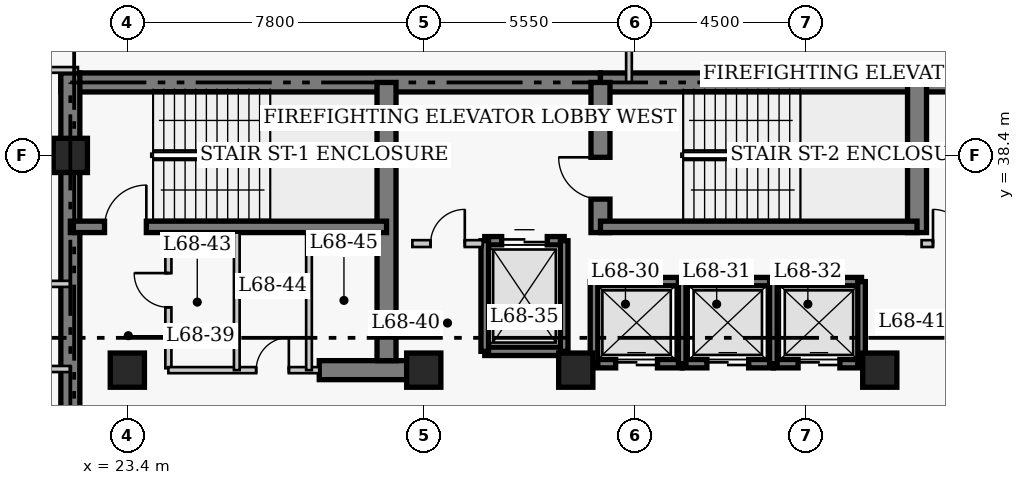
"""IFC4 building model, lengths in metres.
Left out: names, types, materials, properties, quantities, classifications, styles, units other than length and angle.
Written with IfcOpenShell. Run it as: python <this file> out.ifc"""

import sys

from ifc_helpers import new_model, si_unit, direction, frame, frame_2d, origin, origin_2d, place, context, subcontext, project, spatial, rectangle, extrude, element, fill, save


model = new_model("IFC4")
c1 = context("Model", 3, precision=1e-05, world=origin(), true_north=direction((0.0, 1.0)))
c2 = subcontext(c1, "Body", "Model", "MODEL_VIEW")
j1 = project(units=[si_unit("LENGTHUNIT", "METRE"), si_unit("PLANEANGLEUNIT", "RADIAN")], contexts=[c1])
p1 = place(None, origin())
s1 = spatial("IfcSite", under=j1, at=p1, CompositionType="ELEMENT")
p2 = place(p1, origin())
s2 = spatial("IfcBuilding", under=s1, at=p2, CompositionType="ELEMENT")
p3 = place(p2, frame((0.0, 0.0, 273.4)))
s3 = spatial("IfcBuildingStorey", under=s2, at=p3, CompositionType="ELEMENT", Elevation=273.4)
p4 = place(p3, frame((21.65, 40.32, 0.0), z_axis=(0.0, 0.0, 1.0), x_axis=(1.0, 0.0, 0.0)))
e1 = element("IfcWall", 1, at=p4, inside=s3, PredefinedType="SHEAR", context=c2, shape_type="SweptSolid", body=[
    extrude(rectangle(XDim=14.2, YDim=0.5, at=frame_2d((7.1, 0.0))), origin(), (0.0, 0.0, 1.0), 4.0),
])
p5 = place(p3, frame((35.85, 40.32, 0.0), z_axis=(0.0, 0.0, 1.0), x_axis=(1.0, 0.0, 0.0)))
e2 = element("IfcWall", 2, at=p5, inside=s3, PredefinedType="SHEAR", context=c2, shape_type="SweptSolid", body=[
    extrude(rectangle(XDim=12.6, YDim=0.5, at=frame_2d((6.3, 0.0))), origin(), (0.0, 0.0, 1.0), 4.0),
])
p6 = place(p3, frame((21.9, 27.05, 0.0), z_axis=(0.0, 0.0, 1.0), x_axis=(0.0, 1.0, 0.0)))
e3 = element("IfcWall", 3, at=p6, inside=s3, PredefinedType="SHEAR", context=c2, shape_type="SweptSolid", body=[
    extrude(rectangle(XDim=13.52, YDim=0.5, at=frame_2d((6.76, 0.0))), origin(), (0.0, 0.0, 1.0), 4.0),
])
p7 = place(p3, frame((28.45, 32.75, 0.0), z_axis=(0.0, 0.0, 1.0), x_axis=(1.0, 0.0, 0.0)))
e4 = element("IfcWall", 4, at=p7, inside=s3, PredefinedType="SHEAR", context=c2, shape_type="SweptSolid", body=[
    extrude(rectangle(XDim=2.4, YDim=0.5, at=frame_2d((1.2, 0.0))), origin(), (0.0, 0.0, 1.0), 4.0),
])
p8 = place(p3, frame((30.22, 33.0, 0.0), z_axis=(0.0, 0.0, 1.0), x_axis=(0.0, 1.0, 0.0)))
e5 = element("IfcWall", 5, at=p8, inside=s3, PredefinedType="SHEAR", context=c2, shape_type="SweptSolid", body=[
    extrude(rectangle(XDim=7.32, YDim=0.5, at=frame_2d((3.66, 0.0))), origin(), (0.0, 0.0, 1.0), 4.0),
])
p9 = place(p3, frame((35.85, 36.37, 0.0), z_axis=(0.0, 0.0, 1.0), x_axis=(0.0, 1.0, 0.0)))
e6 = element("IfcWall", 6, at=p9, inside=s3, PredefinedType="SHEAR", context=c2, shape_type="SweptSolid", body=[
    extrude(rectangle(XDim=3.95, YDim=0.5, at=frame_2d((1.975, 0.0))), origin(), (0.0, 0.0, 1.0), 4.0),
])
p10 = place(p9, frame((0.88, 0.0, 0.0)))
e7 = element("IfcOpeningElement", 7, at=p10, cuts=e6, PredefinedType="OPENING", context=c2, shape_type="SweptSolid", body=[
    extrude(rectangle(XDim=1.1, YDim=2.15, at=frame_2d((0.55, 1.075))), frame((0.0, 0.26, 0.0), z_axis=(0.0, -1.0, 0.0), x_axis=(1.0, 0.0, 0.0)), (0.0, 0.0, 1.0), 0.52),
])
p11 = place(p3, frame((44.18, 36.37, 0.0), z_axis=(0.0, 0.0, 1.0), x_axis=(0.0, 1.0, 0.0)))
e8 = element("IfcWall", 8, at=p11, inside=s3, PredefinedType="SHEAR", context=c2, shape_type="SweptSolid", body=[
    extrude(rectangle(XDim=3.95, YDim=0.5, at=frame_2d((1.975, 0.0))), origin(), (0.0, 0.0, 1.0), 4.0),
])
p12 = place(p3, frame((21.9, 36.52, 0.0), z_axis=(0.0, 0.0, 1.0), x_axis=(1.0, 0.0, 0.0)))
e9 = element("IfcWall", 9, at=p12, inside=s3, PredefinedType="SHEAR", context=c2, shape_type="SweptSolid", body=[
    extrude(rectangle(XDim=8.32, YDim=0.3, at=frame_2d((4.16, 0.0))), origin(), (0.0, 0.0, 1.0), 4.0),
])
p13 = place(p12, frame((0.9, 0.0, 0.0)))
e10 = element("IfcOpeningElement", 10, at=p13, cuts=e9, PredefinedType="OPENING", context=c2, shape_type="SweptSolid", body=[
    extrude(rectangle(XDim=1.1, YDim=2.15, at=frame_2d((0.55, 1.075))), frame((0.0, 0.16, 0.0), z_axis=(0.0, -1.0, 0.0), x_axis=(1.0, 0.0, 0.0)), (0.0, 0.0, 1.0), 0.32),
])
p14 = place(p3, frame((35.85, 36.52, 0.0), z_axis=(0.0, 0.0, 1.0), x_axis=(1.0, 0.0, 0.0)))
e11 = element("IfcWall", 11, at=p14, inside=s3, PredefinedType="SHEAR", context=c2, shape_type="SweptSolid", body=[
    extrude(rectangle(XDim=8.33, YDim=0.3, at=frame_2d((4.165, 0.0))), origin(), (0.0, 0.0, 1.0), 4.0),
])
for number, where, z_axis, x_axis in (
    (12, (21.9, 38.4, 0.0), (0.0, 0.0, 1.0), (1.0, 0.0, 0.0)),
    (13, (23.4, 32.75, 0.0), (0.0, 0.0, 1.0), (1.0, 0.0, 0.0)),
    (14, (31.2, 32.75, 0.0), (0.0, 0.0, 1.0), (1.0, 0.0, 0.0)),
    (15, (35.2, 32.75, 0.0), (0.0, 0.0, 1.0), (1.0, 0.0, 0.0)),
    (16, (43.2, 32.75, 0.0), (0.0, 0.0, 1.0), (1.0, 0.0, 0.0)),
):
    element("IfcColumn", number, at=place(p3, frame(where, z_axis=z_axis, x_axis=x_axis)), inside=s3, PredefinedType="COLUMN", context=c2, shape_type="SweptSolid", body=[
        extrude(rectangle(XDim=0.9, YDim=0.9, at=origin_2d()), origin(), (0.0, 0.0, 1.0), 4.0),
    ])
p15 = place(p3, frame((35.68, 35.08, 0.0), z_axis=(0.0, 0.0, 1.0), x_axis=(1.0, 0.0, 0.0)))
e17 = element("IfcWall", 17, at=p15, inside=s3, PredefinedType="SHEAR", context=c2, shape_type="SweptSolid", body=[
    extrude(rectangle(XDim=2.32, YDim=0.22, at=frame_2d((1.16, 0.0))), origin(), (0.0, 0.0, 1.0), 4.0),
])
p16 = place(p3, frame((35.68, 32.92, 0.0), z_axis=(0.0, 0.0, 1.0), x_axis=(1.0, 0.0, 0.0)))
e18 = element("IfcWall", 18, at=p16, inside=s3, PredefinedType="SHEAR", context=c2, shape_type="SweptSolid", body=[
    extrude(rectangle(XDim=2.32, YDim=0.22, at=frame_2d((1.16, 0.0))), origin(), (0.0, 0.0, 1.0), 4.0),
])
p17 = place(p16, frame((0.57, 0.0, 0.0)))
e19 = element("IfcOpeningElement", 19, at=p17, cuts=e18, PredefinedType="OPENING", context=c2, shape_type="SweptSolid", body=[
    extrude(rectangle(XDim=1.1, YDim=2.15, at=frame_2d((0.55, 1.075))), frame((0.0, 0.12, 0.0), z_axis=(0.0, -1.0, 0.0), x_axis=(1.0, 0.0, 0.0)), (0.0, 0.0, 1.0), 0.24),
])
p18 = place(p3, frame((35.68, 32.92, 0.0), z_axis=(0.0, 0.0, 1.0), x_axis=(0.0, 1.0, 0.0)))
e20 = element("IfcWall", 20, at=p18, inside=s3, PredefinedType="SHEAR", context=c2, shape_type="SweptSolid", body=[
    extrude(rectangle(XDim=2.16, YDim=0.2, at=frame_2d((1.08, 0.0))), origin(), (0.0, 0.0, 1.0), 4.0),
])
p19 = place(p3, frame((38.0, 35.08, 0.0), z_axis=(0.0, 0.0, 1.0), x_axis=(1.0, 0.0, 0.0)))
e21 = element("IfcWall", 21, at=p19, inside=s3, PredefinedType="SHEAR", context=c2, shape_type="SweptSolid", body=[
    extrude(rectangle(XDim=2.4, YDim=0.22, at=frame_2d((1.2, 0.0))), origin(), (0.0, 0.0, 1.0), 4.0),
])
p20 = place(p3, frame((38.0, 32.92, 0.0), z_axis=(0.0, 0.0, 1.0), x_axis=(1.0, 0.0, 0.0)))
e22 = element("IfcWall", 22, at=p20, inside=s3, PredefinedType="SHEAR", context=c2, shape_type="SweptSolid", body=[
    extrude(rectangle(XDim=2.4, YDim=0.22, at=frame_2d((1.2, 0.0))), origin(), (0.0, 0.0, 1.0), 4.0),
])
p21 = place(p20, frame((0.65, 0.0, 0.0)))
e23 = element("IfcOpeningElement", 23, at=p21, cuts=e22, PredefinedType="OPENING", context=c2, shape_type="SweptSolid", body=[
    extrude(rectangle(XDim=1.1, YDim=2.15, at=frame_2d((0.55, 1.075))), frame((0.0, 0.12, 0.0), z_axis=(0.0, -1.0, 0.0), x_axis=(1.0, 0.0, 0.0)), (0.0, 0.0, 1.0), 0.24),
])
p22 = place(p3, frame((38.0, 32.92, 0.0), z_axis=(0.0, 0.0, 1.0), x_axis=(0.0, 1.0, 0.0)))
e24 = element("IfcWall", 24, at=p22, inside=s3, PredefinedType="SHEAR", context=c2, shape_type="SweptSolid", body=[
    extrude(rectangle(XDim=2.16, YDim=0.2, at=frame_2d((1.08, 0.0))), origin(), (0.0, 0.0, 1.0), 4.0),
])
p23 = place(p3, frame((40.4, 35.08, 0.0), z_axis=(0.0, 0.0, 1.0), x_axis=(1.0, 0.0, 0.0)))
e25 = element("IfcWall", 25, at=p23, inside=s3, PredefinedType="SHEAR", context=c2, shape_type="SweptSolid", body=[
    extrude(rectangle(XDim=2.32, YDim=0.22, at=frame_2d((1.16, 0.0))), origin(), (0.0, 0.0, 1.0), 4.0),
])
p24 = place(p3, frame((40.4, 32.92, 0.0), z_axis=(0.0, 0.0, 1.0), x_axis=(1.0, 0.0, 0.0)))
e26 = element("IfcWall", 26, at=p24, inside=s3, PredefinedType="SHEAR", context=c2, shape_type="SweptSolid", body=[
    extrude(rectangle(XDim=2.32, YDim=0.22, at=frame_2d((1.16, 0.0))), origin(), (0.0, 0.0, 1.0), 4.0),
])
p25 = place(p24, frame((0.65, 0.0, 0.0)))
e27 = element("IfcOpeningElement", 27, at=p25, cuts=e26, PredefinedType="OPENING", context=c2, shape_type="SweptSolid", body=[
    extrude(rectangle(XDim=1.1, YDim=2.15, at=frame_2d((0.55, 1.075))), frame((0.0, 0.12, 0.0), z_axis=(0.0, -1.0, 0.0), x_axis=(1.0, 0.0, 0.0)), (0.0, 0.0, 1.0), 0.24),
])
for number, where, z_axis, x_axis in (
    (28, (40.4, 32.92, 0.0), (0.0, 0.0, 1.0), (0.0, 1.0, 0.0)),
    (29, (42.72, 32.92, 0.0), (0.0, 0.0, 1.0), (0.0, 1.0, 0.0)),
):
    element("IfcWall", number, at=place(p3, frame(where, z_axis=z_axis, x_axis=x_axis)), inside=s3, PredefinedType="SHEAR", context=c2, shape_type="SweptSolid", body=[
        extrude(rectangle(XDim=2.16, YDim=0.2, at=frame_2d((1.08, 0.0))), origin(), (0.0, 0.0, 1.0), 4.0),
    ])
p26 = place(p3, frame((32.805, 36.155, 0.0), z_axis=(0.0, 0.0, 1.0), x_axis=(1.0, 0.0, 0.0)))
e30 = element("IfcWall", 30, at=p26, inside=s3, PredefinedType="SHEAR", context=c2, shape_type="SweptSolid", body=[
    extrude(rectangle(XDim=2.09, YDim=0.22, at=frame_2d((1.045, 0.0))), origin(), (0.0, 0.0, 1.0), 4.0),
])
p27 = place(p26, frame((0.445, 0.0, 0.0)))
e31 = element("IfcOpeningElement", 31, at=p27, cuts=e30, PredefinedType="OPENING", context=c2, shape_type="SweptSolid", body=[
    extrude(rectangle(XDim=1.2, YDim=2.15, at=frame_2d((0.6, 1.075))), frame((0.0, 0.12, 0.0), z_axis=(0.0, -1.0, 0.0), x_axis=(1.0, 0.0, 0.0)), (0.0, 0.0, 1.0), 0.24),
])
p28 = place(p3, frame((32.805, 33.245, 0.0), z_axis=(0.0, 0.0, 1.0), x_axis=(1.0, 0.0, 0.0)))
e32 = element("IfcWall", 32, at=p28, inside=s3, PredefinedType="SHEAR", context=c2, shape_type="SweptSolid", body=[
    extrude(rectangle(XDim=2.09, YDim=0.22, at=frame_2d((1.045, 0.0))), origin(), (0.0, 0.0, 1.0), 4.0),
])
for number, where, z_axis, x_axis in (
    (33, (32.805, 33.245, 0.0), (0.0, 0.0, 1.0), (0.0, 1.0, 0.0)),
    (34, (34.895, 33.245, 0.0), (0.0, 0.0, 1.0), (0.0, 1.0, 0.0)),
):
    element("IfcWall", number, at=place(p3, frame(where, z_axis=z_axis, x_axis=x_axis)), inside=s3, PredefinedType="SHEAR", context=c2, shape_type="SweptSolid", body=[
        extrude(rectangle(XDim=2.91, YDim=0.2, at=frame_2d((1.455, 0.0))), origin(), (0.0, 0.0, 1.0), 4.0),
    ])
p29 = place(p3, frame((30.9, 36.08, 0.0), z_axis=(0.0, 0.0, 1.0), x_axis=(1.0, 0.0, 0.0)))
e35 = element("IfcWall", 35, at=p29, inside=s3, PredefinedType="PARTITIONING", context=c2, shape_type="SweptSolid", body=[
    extrude(rectangle(XDim=1.85, YDim=0.18, at=frame_2d((0.925, 0.0))), origin(), (0.0, 0.0, 1.0), 3.76),
])
p30 = place(p29, frame((0.48, 0.0, 0.0)))
e36 = element("IfcOpeningElement", 36, at=p30, cuts=e35, PredefinedType="OPENING", context=c2, shape_type="SweptSolid", body=[
    extrude(rectangle(XDim=0.9, YDim=2.15, at=frame_2d((0.45, 1.075))), frame((0.0, 0.1, 0.0), z_axis=(0.0, -1.0, 0.0), x_axis=(1.0, 0.0, 0.0)), (0.0, 0.0, 1.0), 0.2),
])
p31 = place(p3, frame((44.3, 36.08, 0.0), z_axis=(0.0, 0.0, 1.0), x_axis=(1.0, 0.0, 0.0)))
e37 = element("IfcWall", 37, at=p31, inside=s3, PredefinedType="PARTITIONING", context=c2, shape_type="SweptSolid", body=[
    extrude(rectangle(XDim=1.5, YDim=0.18, at=frame_2d((0.75, 0.0))), origin(), (0.0, 0.0, 1.0), 3.76),
])
p32 = place(p31, frame((0.3, 0.0, 0.0)))
e38 = element("IfcOpeningElement", 38, at=p32, cuts=e37, PredefinedType="OPENING", context=c2, shape_type="SweptSolid", body=[
    extrude(rectangle(XDim=0.9, YDim=2.15, at=frame_2d((0.45, 1.075))), frame((0.0, 0.1, 0.0), z_axis=(0.0, -1.0, 0.0), x_axis=(1.0, 0.0, 0.0)), (0.0, 0.0, 1.0), 0.2),
])
p33 = place(p3, frame((24.48, 32.8, 0.0), z_axis=(0.0, 0.0, 1.0), x_axis=(0.0, 1.0, 0.0)))
e39 = element("IfcWall", 39, at=p33, inside=s3, PredefinedType="PARTITIONING", context=c2, shape_type="SweptSolid", body=[
    extrude(rectangle(XDim=3.57, YDim=0.16, at=frame_2d((1.785, 0.0))), origin(), (0.0, 0.0, 1.0), 3.76),
])
p34 = place(p33, frame((1.604, 0.0, 0.0)))
e40 = element("IfcOpeningElement", 40, at=p34, cuts=e39, PredefinedType="OPENING", context=c2, shape_type="SweptSolid", body=[
    extrude(rectangle(XDim=0.9, YDim=2.1, at=frame_2d((0.45, 1.05))), frame((0.0, 0.09, 0.0), z_axis=(0.0, -1.0, 0.0), x_axis=(1.0, 0.0, 0.0)), (0.0, 0.0, 1.0), 0.18),
])
p35 = place(p3, frame((24.48, 32.75, 0.0), z_axis=(0.0, 0.0, 1.0), x_axis=(1.0, 0.0, 0.0)))
e41 = element("IfcWall", 41, at=p35, inside=s3, PredefinedType="PARTITIONING", context=c2, shape_type="SweptSolid", body=[
    extrude(rectangle(XDim=3.97, YDim=0.16, at=frame_2d((1.985, 0.0))), origin(), (0.0, 0.0, 1.0), 3.76),
])
p36 = place(p35, frame((2.31, 0.0, 0.0)))
e42 = element("IfcOpeningElement", 42, at=p36, cuts=e41, PredefinedType="OPENING", context=c2, shape_type="SweptSolid", body=[
    extrude(rectangle(XDim=0.86, YDim=2.05, at=frame_2d((0.43, 1.025))), frame((0.0, 0.09, 0.0), z_axis=(0.0, -1.0, 0.0), x_axis=(1.0, 0.0, 0.0)), (0.0, 0.0, 1.0), 0.18),
])
for number, where, z_axis, x_axis in (
    (43, (26.28, 32.75, 0.0), (0.0, 0.0, 1.0), (0.0, 1.0, 0.0)),
    (44, (28.18, 32.75, 0.0), (0.0, 0.0, 1.0), (0.0, 1.0, 0.0)),
):
    element("IfcWall", number, at=place(p3, frame(where, z_axis=z_axis, x_axis=x_axis)), inside=s3, PredefinedType="PARTITIONING", context=c2, shape_type="SweptSolid", body=[
        extrude(rectangle(XDim=3.62, YDim=0.15, at=frame_2d((1.81, 0.0))), origin(), (0.0, 0.0, 1.0), 3.76),
    ])
for number, where, z_axis, x_axis in (
    (45, (20.46, 35.02, 0.0), (0.0, 0.0, 1.0), (1.0, 0.0, 0.0)),
    (46, (20.46, 32.78, 0.0), (0.0, 0.0, 1.0), (1.0, 0.0, 0.0)),
):
    element("IfcWall", number, at=place(p3, frame(where, z_axis=z_axis, x_axis=x_axis)), inside=s3, PredefinedType="PARTITIONING", context=c2, shape_type="SweptSolid", body=[
        extrude(rectangle(XDim=1.44, YDim=0.16, at=frame_2d((0.72, 0.0))), origin(), (0.0, 0.0, 1.0), 3.76),
    ])
p37 = place(p3, frame((18.24, 40.65, 0.0), z_axis=(0.0, 0.0, 1.0), x_axis=(1.0, 0.0, 0.0)))
e47 = element("IfcWall", 47, at=p37, inside=s3, PredefinedType="PARTITIONING", context=c2, shape_type="SweptSolid", body=[
    extrude(rectangle(XDim=3.86, YDim=0.15, at=frame_2d((1.93, 0.0))), origin(), (0.0, 0.0, 1.0), 3.76),
])
p38 = place(p37, frame((0.55, 0.0, 0.0)))
e48 = element("IfcOpeningElement", 48, at=p38, cuts=e47, PredefinedType="OPENING", context=c2, shape_type="SweptSolid", body=[
    extrude(rectangle(XDim=1.0, YDim=2.15, at=frame_2d((0.5, 1.075))), frame((0.0, 0.085, 0.0), z_axis=(0.0, -1.0, 0.0), x_axis=(1.0, 0.0, 0.0)), (0.0, 0.0, 1.0), 0.17),
])
p39 = place(p3, frame((36.6, 40.32, 0.0), z_axis=(0.0, 0.0, 1.0), x_axis=(0.0, 1.0, 0.0)))
e49 = element("IfcWall", 49, at=p39, inside=s3, PredefinedType="PARTITIONING", context=c2, shape_type="SweptSolid", body=[
    extrude(rectangle(XDim=3.545, YDim=0.15, at=frame_2d((1.772, 0.0))), origin(), (0.0, 0.0, 1.0), 3.76),
])
p40 = place(p17, origin())
e50 = element("IfcDoor", 50, at=p40, inside=s3, OperationType="DOUBLE_DOOR_SLIDING", PredefinedType="DOOR", context=c2, shape_type="SweptSolid", body=[
    extrude(rectangle(XDim=1.1, YDim=2.15, at=frame_2d((0.55, 1.075))), frame((0.0, 0.025, 0.0), z_axis=(0.0, -1.0, 0.0), x_axis=(1.0, 0.0, 0.0)), (0.0, 0.0, 1.0), 0.05),
])
fill(e19, e50)
p41 = place(p21, origin())
e51 = element("IfcDoor", 51, at=p41, inside=s3, OperationType="DOUBLE_DOOR_SLIDING", PredefinedType="DOOR", context=c2, shape_type="SweptSolid", body=[
    extrude(rectangle(XDim=1.1, YDim=2.15, at=frame_2d((0.55, 1.075))), frame((0.0, 0.025, 0.0), z_axis=(0.0, -1.0, 0.0), x_axis=(1.0, 0.0, 0.0)), (0.0, 0.0, 1.0), 0.05),
])
fill(e23, e51)
p42 = place(p25, origin())
e52 = element("IfcDoor", 52, at=p42, inside=s3, OperationType="DOUBLE_DOOR_SLIDING", PredefinedType="DOOR", context=c2, shape_type="SweptSolid", body=[
    extrude(rectangle(XDim=1.1, YDim=2.15, at=frame_2d((0.55, 1.075))), frame((0.0, 0.025, 0.0), z_axis=(0.0, -1.0, 0.0), x_axis=(1.0, 0.0, 0.0)), (0.0, 0.0, 1.0), 0.05),
])
fill(e27, e52)
p43 = place(p27, origin())
e53 = element("IfcDoor", 53, at=p43, inside=s3, OperationType="DOUBLE_DOOR_SLIDING", PredefinedType="DOOR", context=c2, shape_type="SweptSolid", body=[
    extrude(rectangle(XDim=1.2, YDim=2.15, at=frame_2d((0.6, 1.075))), frame((0.0, 0.025, 0.0), z_axis=(0.0, -1.0, 0.0), x_axis=(1.0, 0.0, 0.0)), (0.0, 0.0, 1.0), 0.05),
])
fill(e31, e53)
p44 = place(p30, origin())
e54 = element("IfcDoor", 54, at=p44, inside=s3, OperationType="SINGLE_SWING_RIGHT", PredefinedType="DOOR", context=c2, shape_type="SweptSolid", body=[
    extrude(rectangle(XDim=0.9, YDim=2.15, at=frame_2d((0.45, 1.075))), frame((0.0, 0.025, 0.0), z_axis=(0.0, -1.0, 0.0), x_axis=(1.0, 0.0, 0.0)), (0.0, 0.0, 1.0), 0.05),
])
fill(e36, e54)
p45 = place(p32, origin())
e55 = element("IfcDoor", 55, at=p45, inside=s3, OperationType="SINGLE_SWING_LEFT", PredefinedType="DOOR", context=c2, shape_type="SweptSolid", body=[
    extrude(rectangle(XDim=0.9, YDim=2.15, at=frame_2d((0.45, 1.075))), frame((0.0, 0.025, 0.0), z_axis=(0.0, -1.0, 0.0), x_axis=(1.0, 0.0, 0.0)), (0.0, 0.0, 1.0), 0.05),
])
fill(e38, e55)
p46 = place(p34, origin())
e56 = element("IfcDoor", 56, at=p46, inside=s3, OperationType="SINGLE_SWING_RIGHT", PredefinedType="DOOR", context=c2, shape_type="SweptSolid", body=[
    extrude(rectangle(XDim=0.9, YDim=2.1, at=frame_2d((0.45, 1.05))), frame((0.0, 0.025, 0.0), z_axis=(0.0, -1.0, 0.0), x_axis=(1.0, 0.0, 0.0)), (0.0, 0.0, 1.0), 0.05),
])
fill(e40, e56)
p47 = place(p36, origin())
e57 = element("IfcDoor", 57, at=p47, inside=s3, OperationType="SINGLE_SWING_RIGHT", PredefinedType="DOOR", context=c2, shape_type="SweptSolid", body=[
    extrude(rectangle(XDim=0.86, YDim=2.05, at=frame_2d((0.43, 1.025))), frame((0.0, 0.025, 0.0), z_axis=(0.0, -1.0, 0.0), x_axis=(1.0, 0.0, 0.0)), (0.0, 0.0, 1.0), 0.05),
])
fill(e42, e57)
p48 = place(p13, origin())
e58 = element("IfcDoor", 58, at=p48, inside=s3, OperationType="SINGLE_SWING_RIGHT", PredefinedType="DOOR", context=c2, shape_type="SweptSolid", body=[
    extrude(rectangle(XDim=1.1, YDim=2.15, at=frame_2d((0.55, 1.075))), frame((0.0, 0.025, 0.0), z_axis=(0.0, -1.0, 0.0), x_axis=(1.0, 0.0, 0.0)), (0.0, 0.0, 1.0), 0.05),
])
fill(e10, e58)
p49 = place(p10, origin())
e59 = element("IfcDoor", 59, at=p49, inside=s3, OperationType="SINGLE_SWING_RIGHT", PredefinedType="DOOR", context=c2, shape_type="SweptSolid", body=[
    extrude(rectangle(XDim=1.1, YDim=2.15, at=frame_2d((0.55, 1.075))), frame((0.0, 0.025, 0.0), z_axis=(0.0, -1.0, 0.0), x_axis=(1.0, 0.0, 0.0)), (0.0, 0.0, 1.0), 0.05),
])
fill(e7, e59)
save(model, sys.argv[1])
